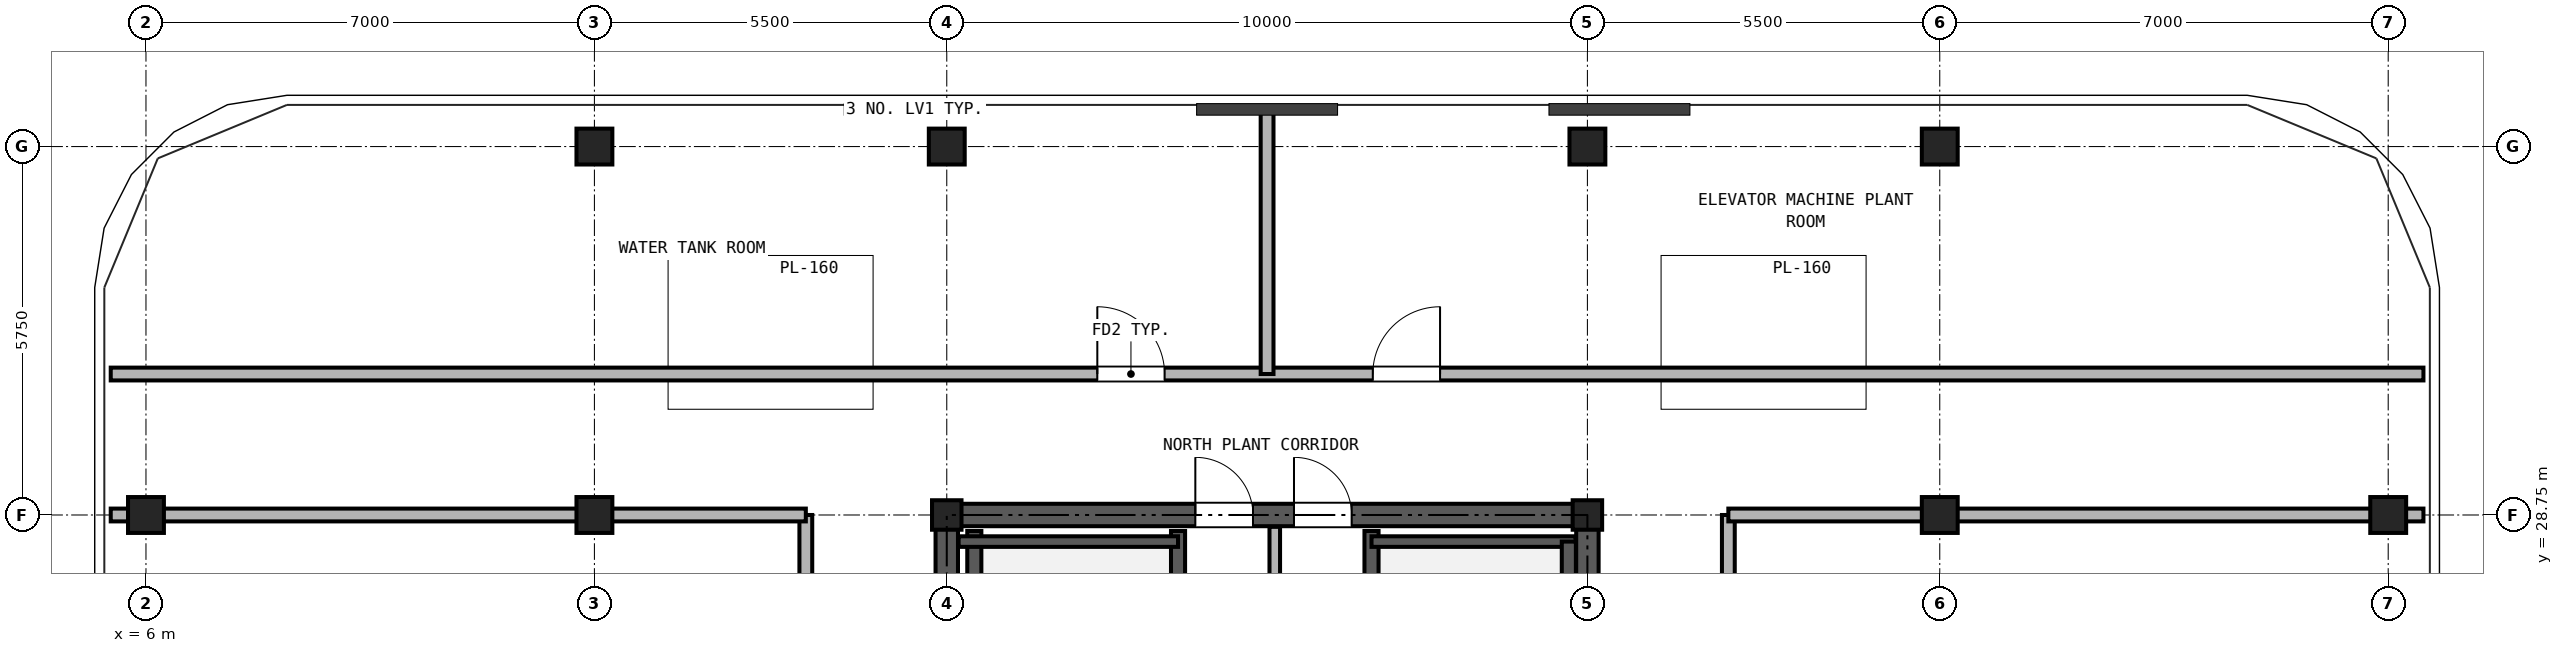
"""IFC4 building model, lengths in metres.
Left out: names, types, materials, properties, quantities, classifications, styles, units other than length and angle.
Written with IfcOpenShell. Run it as: python <this file> out.ifc"""

import sys

from ifc_helpers import new_model, si_unit, direction, frame, frame_2d, origin, origin_2d, place, context, subcontext, project, spatial, rectangle, hollow_rectangle, extrude, source, transform, mapped, element, fill, save


model = new_model("IFC4")
c1 = context("Model", 3, precision=1e-05, world=origin(), true_north=direction((0.0, 1.0)))
c2 = subcontext(c1, "Body", "Model", "MODEL_VIEW")
j1 = project(units=[si_unit("LENGTHUNIT", "METRE"), si_unit("PLANEANGLEUNIT", "RADIAN")], contexts=[c1])
p1 = place(None, origin())
s1 = spatial("IfcSite", under=j1, at=p1, CompositionType="ELEMENT")
p2 = place(p1, origin())
s2 = spatial("IfcBuilding", under=s1, at=p2, CompositionType="ELEMENT")
p3 = place(p2, frame((0.0, 0.0, 274.9)))
s3 = spatial("IfcBuildingStorey", under=s2, at=p3, CompositionType="ELEMENT", Elevation=274.9)
m1 = source(origin(), c2, "Body", "SweptSolid", [
    extrude(hollow_rectangle(XDim=0.56, YDim=0.56, WallThickness=0.03, at=origin_2d()), origin(), (0.0, 0.0, 1.0), 3.38),
])
for number, where, z_axis, x_axis in (
    (1, (13.0, 34.5, 0.0), (0.0, 0.0, 1.0), (1.0, 0.0, 0.0)),
    (2, (18.5, 34.5, 0.0), (0.0, 0.0, 1.0), (1.0, 0.0, 0.0)),
    (3, (28.5, 34.5, 0.0), (0.0, 0.0, 1.0), (1.0, 0.0, 0.0)),
    (4, (34.0, 34.5, 0.0), (0.0, 0.0, 1.0), (1.0, 0.0, 0.0)),
    (5, (6.0, 28.75, 0.0), (0.0, 0.0, 1.0), (1.0, 0.0, 0.0)),
    (6, (41.0, 28.75, 0.0), (0.0, 0.0, 1.0), (1.0, 0.0, 0.0)),
    (7, (13.0, 28.75, 0.0), (0.0, 0.0, 1.0), (1.0, 0.0, 0.0)),
):
    element("IfcColumn", number, at=place(p3, frame(where, z_axis=z_axis, x_axis=x_axis)), inside=s3, PredefinedType="COLUMN", context=c2, shape_type="MappedRepresentation", body=[
        mapped(m1, transform((0.0, 0.0, 0.0), x_axis=(1.0, 0.0, 0.0), y_axis=(0.0, 1.0, 0.0), z_axis=(0.0, 0.0, 1.0), scale=1.0)),
    ])
m2 = source(origin(), c2, "Body", "SweptSolid", [
    extrude(hollow_rectangle(XDim=0.46, YDim=0.46, WallThickness=0.025, at=origin_2d()), origin(), (0.0, 0.0, 1.0), 3.38),
])
for number, where, z_axis, x_axis in (
    (8, (18.5, 28.75, 0.0), (0.0, 0.0, 1.0), (1.0, 0.0, 0.0)),
    (9, (28.5, 28.75, 0.0), (0.0, 0.0, 1.0), (1.0, 0.0, 0.0)),
):
    element("IfcColumn", number, at=place(p3, frame(where, z_axis=z_axis, x_axis=x_axis)), inside=s3, PredefinedType="COLUMN", context=c2, shape_type="MappedRepresentation", body=[
        mapped(m2, transform((0.0, 0.0, 0.0), x_axis=(1.0, 0.0, 0.0), y_axis=(0.0, 1.0, 0.0), z_axis=(0.0, 0.0, 1.0), scale=1.0)),
    ])
p4 = place(p3, frame((34.0, 28.75, 0.0), z_axis=(0.0, 0.0, 1.0), x_axis=(1.0, 0.0, 0.0)))
e10 = element("IfcColumn", 10, at=p4, inside=s3, PredefinedType="COLUMN", context=c2, shape_type="MappedRepresentation", body=[
    mapped(m1, transform((0.0, 0.0, 0.0), x_axis=(1.0, 0.0, 0.0), y_axis=(0.0, 1.0, 0.0), z_axis=(0.0, 0.0, 1.0), scale=1.0)),
])
p5 = place(p3, frame((18.325, 28.75, 0.0), z_axis=(0.0, 0.0, 1.0), x_axis=(1.0, 0.0, 0.0)))
e11 = element("IfcWall", 11, at=p5, inside=s3, PredefinedType="SHEAR", context=c2, shape_type="SweptSolid", body=[
    extrude(rectangle(XDim=10.35, YDim=0.35, at=frame_2d((5.175, 0.0))), origin(), (0.0, 0.0, 1.0), 3.38),
])
p6 = place(p5, frame((4.055, 0.0, 0.0)))
e12 = element("IfcOpeningElement", 12, at=p6, cuts=e11, PredefinedType="OPENING", context=c2, shape_type="SweptSolid", body=[
    extrude(rectangle(XDim=0.9, YDim=2.05, at=frame_2d((0.45, 1.025))), frame((0.0, 0.185, 0.0), z_axis=(0.0, -1.0, 0.0), x_axis=(1.0, 0.0, 0.0)), (0.0, 0.0, 1.0), 0.37),
])
p7 = place(p5, frame((5.595, 0.0, 0.0)))
e13 = element("IfcOpeningElement", 13, at=p7, cuts=e11, PredefinedType="OPENING", context=c2, shape_type="SweptSolid", body=[
    extrude(rectangle(XDim=0.9, YDim=2.05, at=frame_2d((0.45, 1.025))), frame((0.0, 0.185, 0.0), z_axis=(0.0, -1.0, 0.0), x_axis=(1.0, 0.0, 0.0)), (0.0, 0.0, 1.0), 0.37),
])
p8 = place(p3, frame((18.5, 11.675, 0.0), z_axis=(0.0, 0.0, 1.0), x_axis=(0.0, 1.0, 0.0)))
e14 = element("IfcWall", 14, at=p8, inside=s3, PredefinedType="SHEAR", context=c2, shape_type="SweptSolid", body=[
    extrude(rectangle(XDim=16.9, YDim=0.35, at=frame_2d((8.45, 0.0))), origin(), (0.0, 0.0, 1.0), 3.38),
])
p9 = place(p8, frame((7.475, 0.0, 0.0)))
e15 = element("IfcOpeningElement", 15, at=p9, cuts=e14, PredefinedType="OPENING", context=c2, shape_type="SweptSolid", body=[
    extrude(rectangle(XDim=1.15, YDim=2.2, at=frame_2d((0.575, 1.1))), frame((0.0, 0.185, 0.0), z_axis=(0.0, -1.0, 0.0), x_axis=(1.0, 0.0, 0.0)), (0.0, 0.0, 1.0), 0.37),
])
p10 = place(p3, frame((28.5, 11.675, 0.0), z_axis=(0.0, 0.0, 1.0), x_axis=(0.0, 1.0, 0.0)))
e16 = element("IfcWall", 16, at=p10, inside=s3, PredefinedType="SHEAR", context=c2, shape_type="SweptSolid", body=[
    extrude(rectangle(XDim=16.9, YDim=0.35, at=frame_2d((8.45, 0.0))), origin(), (0.0, 0.0, 1.0), 3.38),
])
p11 = place(p10, frame((7.475, 0.0, 0.0)))
e17 = element("IfcOpeningElement", 17, at=p11, cuts=e16, PredefinedType="OPENING", context=c2, shape_type="SweptSolid", body=[
    extrude(rectangle(XDim=1.15, YDim=2.2, at=frame_2d((0.575, 1.1))), frame((0.0, 0.185, 0.0), z_axis=(0.0, -1.0, 0.0), x_axis=(1.0, 0.0, 0.0)), (0.0, 0.0, 1.0), 0.37),
])
for number, where, z_axis, x_axis in (
    (18, (18.93, 21.39, 0.0), (0.0, 0.0, 1.0), (0.0, 1.0, 0.0)),
    (19, (22.11, 21.39, 0.0), (0.0, 0.0, 1.0), (0.0, 1.0, 0.0)),
    (20, (25.13, 21.39, 0.0), (0.0, 0.0, 1.0), (0.0, 1.0, 0.0)),
):
    element("IfcWall", number, at=place(p3, frame(where, z_axis=z_axis, x_axis=x_axis)), inside=s3, PredefinedType="SOLIDWALL", context=c2, shape_type="SweptSolid", body=[
        extrude(rectangle(XDim=7.11, YDim=0.22, at=frame_2d((3.555, 0.0))), origin(), (0.0, 0.0, 1.0), 3.38),
    ])
p12 = place(p3, frame((18.685, 28.335, 0.0), z_axis=(0.0, 0.0, 1.0), x_axis=(1.0, 0.0, 0.0)))
e21 = element("IfcWall", 21, at=p12, inside=s3, PredefinedType="PARTITIONING", context=c2, shape_type="SweptSolid", body=[
    extrude(rectangle(XDim=3.425, YDim=0.165, at=frame_2d((1.712, 0.0))), origin(), (0.0, 0.0, 1.0), 3.38),
])
p13 = place(p3, frame((25.13, 28.335, 0.0), z_axis=(0.0, 0.0, 1.0), x_axis=(1.0, 0.0, 0.0)))
e22 = element("IfcWall", 22, at=p13, inside=s3, PredefinedType="PARTITIONING", context=c2, shape_type="SweptSolid", body=[
    extrude(rectangle(XDim=3.185, YDim=0.165, at=frame_2d((1.593, 0.0))), origin(), (0.0, 0.0, 1.0), 3.38),
])
p14 = place(p3, frame((28.21, 21.39, 0.0), z_axis=(0.0, 0.0, 1.0), x_axis=(0.0, 1.0, 0.0)))
e23 = element("IfcWall", 23, at=p14, inside=s3, PredefinedType="SOLIDWALL", context=c2, shape_type="SweptSolid", body=[
    extrude(rectangle(XDim=6.945, YDim=0.22, at=frame_2d((3.473, 0.0))), origin(), (0.0, 0.0, 1.0), 3.38),
])
p15 = place(p3, frame((23.62, 24.4, 0.0), z_axis=(0.0, 0.0, 1.0), x_axis=(0.0, 1.0, 0.0)))
e24 = element("IfcWall", 24, at=p15, inside=s3, PredefinedType="PARTITIONING", context=c2, shape_type="SweptSolid", body=[
    extrude(rectangle(XDim=4.165, YDim=0.165, at=frame_2d((2.083, 0.0))), origin(), (0.0, 0.0, 1.0), 3.38),
])
p16 = place(p3, frame((5.45, 30.95, 0.0), z_axis=(0.0, 0.0, 1.0), x_axis=(1.0, 0.0, 0.0)))
e25 = element("IfcWall", 25, at=p16, inside=s3, PredefinedType="PARTITIONING", context=c2, shape_type="SweptSolid", body=[
    extrude(rectangle(XDim=36.1, YDim=0.2, at=frame_2d((18.05, 0.0))), origin(), (0.0, 0.0, 1.0), 3.38),
])
p17 = place(p16, frame((15.4, 0.0, 0.0)))
e26 = element("IfcOpeningElement", 26, at=p17, cuts=e25, PredefinedType="OPENING", context=c2, shape_type="SweptSolid", body=[
    extrude(rectangle(XDim=1.05, YDim=2.15, at=frame_2d((0.525, 1.075))), frame((0.0, 0.11, 0.0), z_axis=(0.0, -1.0, 0.0), x_axis=(1.0, 0.0, 0.0)), (0.0, 0.0, 1.0), 0.22),
])
p18 = place(p16, frame((19.7, 0.0, 0.0)))
e27 = element("IfcOpeningElement", 27, at=p18, cuts=e25, PredefinedType="OPENING", context=c2, shape_type="SweptSolid", body=[
    extrude(rectangle(XDim=1.05, YDim=2.15, at=frame_2d((0.525, 1.075))), frame((0.0, 0.11, 0.0), z_axis=(0.0, -1.0, 0.0), x_axis=(1.0, 0.0, 0.0)), (0.0, 0.0, 1.0), 0.22),
])
p19 = place(p3, frame((16.3, 8.9, 0.0), z_axis=(0.0, 0.0, 1.0), x_axis=(0.0, 1.0, 0.0)))
e28 = element("IfcWall", 28, at=p19, inside=s3, PredefinedType="PARTITIONING", context=c2, shape_type="SweptSolid", body=[
    extrude(rectangle(XDim=19.85, YDim=0.2, at=frame_2d((9.925, 0.0))), origin(), (0.0, 0.0, 1.0), 3.38),
])
p20 = place(p19, frame((4.55, 0.0, 0.0)))
e29 = element("IfcOpeningElement", 29, at=p20, cuts=e28, PredefinedType="OPENING", context=c2, shape_type="SweptSolid", body=[
    extrude(rectangle(XDim=1.05, YDim=2.15, at=frame_2d((0.525, 1.075))), frame((0.0, 0.11, 0.0), z_axis=(0.0, -1.0, 0.0), x_axis=(1.0, 0.0, 0.0)), (0.0, 0.0, 1.0), 0.22),
])
p21 = place(p19, frame((14.475, 0.0, 0.0)))
e30 = element("IfcOpeningElement", 30, at=p21, cuts=e28, PredefinedType="OPENING", context=c2, shape_type="SweptSolid", body=[
    extrude(rectangle(XDim=1.05, YDim=2.15, at=frame_2d((0.525, 1.075))), frame((0.0, 0.11, 0.0), z_axis=(0.0, -1.0, 0.0), x_axis=(1.0, 0.0, 0.0)), (0.0, 0.0, 1.0), 0.22),
])
p22 = place(p3, frame((30.7, 8.9, 0.0), z_axis=(0.0, 0.0, 1.0), x_axis=(0.0, 1.0, 0.0)))
e31 = element("IfcWall", 31, at=p22, inside=s3, PredefinedType="PARTITIONING", context=c2, shape_type="SweptSolid", body=[
    extrude(rectangle(XDim=19.85, YDim=0.2, at=frame_2d((9.925, 0.0))), origin(), (0.0, 0.0, 1.0), 3.38),
])
p23 = place(p22, frame((9.425, 0.0, 0.0)))
e32 = element("IfcOpeningElement", 32, at=p23, cuts=e31, PredefinedType="OPENING", context=c2, shape_type="SweptSolid", body=[
    extrude(rectangle(XDim=1.05, YDim=2.15, at=frame_2d((0.525, 1.075))), frame((0.0, 0.11, 0.0), z_axis=(0.0, -1.0, 0.0), x_axis=(1.0, 0.0, 0.0)), (0.0, 0.0, 1.0), 0.22),
])
for number, where, z_axis, x_axis in (
    (33, (5.45, 28.75, 0.0), (0.0, 0.0, 1.0), (1.0, 0.0, 0.0)),
    (34, (30.7, 28.75, 0.0), (0.0, 0.0, 1.0), (1.0, 0.0, 0.0)),
):
    element("IfcWall", number, at=place(p3, frame(where, z_axis=z_axis, x_axis=x_axis)), inside=s3, PredefinedType="PARTITIONING", context=c2, shape_type="SweptSolid", body=[
        extrude(rectangle(XDim=10.85, YDim=0.2, at=frame_2d((5.425, 0.0))), origin(), (0.0, 0.0, 1.0), 2.905),
    ])
p24 = place(p3, frame((23.5, 30.95, 0.0), z_axis=(0.0, 0.0, 1.0), x_axis=(0.0, 1.0, 0.0)))
e35 = element("IfcWall", 35, at=p24, inside=s3, PredefinedType="PARTITIONING", context=c2, shape_type="SweptSolid", body=[
    extrude(rectangle(XDim=4.1, YDim=0.2, at=frame_2d((2.05, 0.0))), origin(), (0.0, 0.0, 1.0), 3.38),
])
p25 = place(p6, origin())
e36 = element("IfcDoor", 36, at=p25, inside=s3, OperationType="SINGLE_SWING_LEFT", PredefinedType="DOOR", context=c2, shape_type="SweptSolid", body=[
    extrude(rectangle(XDim=0.9, YDim=2.05, at=frame_2d((0.45, 1.025))), frame((0.0, 0.025, 0.0), z_axis=(0.0, -1.0, 0.0), x_axis=(1.0, 0.0, 0.0)), (0.0, 0.0, 1.0), 0.05),
])
fill(e12, e36)
p26 = place(p7, origin())
e37 = element("IfcDoor", 37, at=p26, inside=s3, OperationType="SINGLE_SWING_LEFT", PredefinedType="DOOR", context=c2, shape_type="SweptSolid", body=[
    extrude(rectangle(XDim=0.9, YDim=2.05, at=frame_2d((0.45, 1.025))), frame((0.0, 0.025, 0.0), z_axis=(0.0, -1.0, 0.0), x_axis=(1.0, 0.0, 0.0)), (0.0, 0.0, 1.0), 0.05),
])
fill(e13, e37)
p27 = place(p17, origin())
e38 = element("IfcDoor", 38, at=p27, inside=s3, OperationType="SINGLE_SWING_LEFT", PredefinedType="DOOR", context=c2, shape_type="SweptSolid", body=[
    extrude(rectangle(XDim=1.05, YDim=2.15, at=frame_2d((0.525, 1.075))), frame((0.0, 0.025, 0.0), z_axis=(0.0, -1.0, 0.0), x_axis=(1.0, 0.0, 0.0)), (0.0, 0.0, 1.0), 0.05),
])
fill(e26, e38)
p28 = place(p18, origin())
e39 = element("IfcDoor", 39, at=p28, inside=s3, OperationType="SINGLE_SWING_RIGHT", PredefinedType="DOOR", context=c2, shape_type="SweptSolid", body=[
    extrude(rectangle(XDim=1.05, YDim=2.15, at=frame_2d((0.525, 1.075))), frame((0.0, 0.025, 0.0), z_axis=(0.0, -1.0, 0.0), x_axis=(1.0, 0.0, 0.0)), (0.0, 0.0, 1.0), 0.05),
])
fill(e27, e39)
save(model, sys.argv[1])
